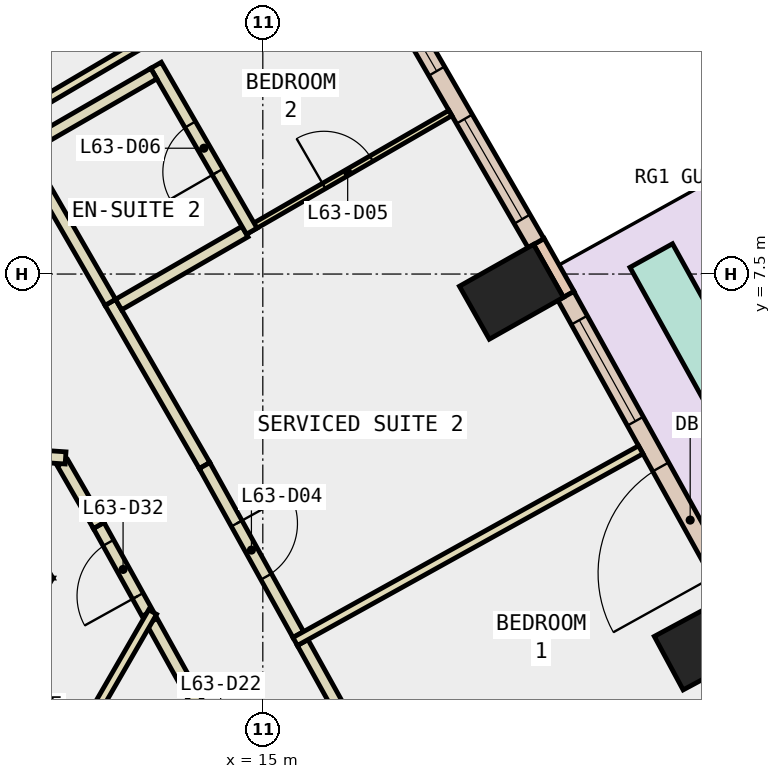
"""IFC4 building model, lengths in metres.
Left out: names, types, materials, properties, quantities, classifications, styles, units other than length and angle.
Written with IfcOpenShell. Run it as: python <this file> out.ifc"""

import sys

from ifc_helpers import new_model, si_unit, direction, frame, frame_2d, origin, origin_2d, place, context, subcontext, project, spatial, polyline, rectangle, outline, extrude, element, fill, save


model = new_model("IFC4")
c1 = context("Model", 3, precision=1e-05, world=origin(), true_north=direction((0.0, 1.0)))
c2 = subcontext(c1, "Body", "Model", "MODEL_VIEW")
j1 = project(units=[si_unit("LENGTHUNIT", "METRE"), si_unit("PLANEANGLEUNIT", "RADIAN")], contexts=[c1])
p1 = place(None, origin())
s1 = spatial("IfcSite", under=j1, at=p1, CompositionType="ELEMENT")
p2 = place(p1, origin())
s2 = spatial("IfcBuilding", under=s1, at=p2, CompositionType="ELEMENT")
p3 = place(p2, frame((0.0, 0.0, 273.8)))
s3 = spatial("IfcBuildingStorey", under=s2, at=p3, CompositionType="ELEMENT", Elevation=273.8)
for number, where, z_axis, x_axis in (
    (1, (22.292, 1.433, -0.34), (0.0, 0.0, 1.0), (-0.474, 0.881, 0.0)),
    (2, (19.089, 7.208, -0.34), (0.0, 0.0, 1.0), (-0.491, 0.871, 0.0)),
):
    element("IfcColumn", number, at=place(p3, frame(where, z_axis=z_axis, x_axis=x_axis)), inside=s3, PredefinedType="COLUMN", context=c2, shape_type="SweptSolid", body=[
        extrude(rectangle(XDim=1.0, YDim=1.4, at=origin_2d()), origin(), (0.0, 0.0, 1.0), 3.6),
    ])
p4 = place(p3, frame((0.0, 0.0, -0.34)))
e3 = element("IfcWall", 3, at=p4, inside=s3, PredefinedType="SHEAR", context=c2, shape_type="SweptSolid", body=[
    extrude(outline(polyline([(6.786, 10.747), (5.833, 10.197), (10.277, 2.5), (11.547, 2.5), (6.786, 10.747)])), origin(), (0.0, 0.0, 1.0), 3.6),
])
p5 = place(p3, frame((0.0, 0.0, -0.34)))
e4 = element("IfcWall", 4, at=p5, inside=s3, PredefinedType="SHEAR", context=c2, shape_type="SweptSolid", body=[
    extrude(outline(polyline([(5.774, -7.5), (11.547, 2.5), (10.277, 2.5), (5.138, -6.4), (5.774, -7.5)])), origin(), (0.0, 0.0, 1.0), 3.6),
])
p6 = place(p3, frame((20.032, 7.165, 0.0), z_axis=(0.0, 0.0, 1.0), x_axis=(-0.491848119507, 0.870681013539, 0.0)))
e5 = element("IfcWall", 5, at=p6, inside=s3, PredefinedType="STANDARD", context=c2, shape_type="SweptSolid", body=[
    extrude(rectangle(XDim=1.0, YDim=0.2, at=frame_2d((0.5, 0.0))), origin(), (0.0, 0.0, 1.0), 3.26),
])
p7 = place(p3, frame((22.71, 2.225, 0.0), z_axis=(0.0, 0.0, 1.0), x_axis=(-0.485049005017, 0.874486971162, 0.0)))
e6 = element("IfcWall", 6, at=p7, inside=s3, PredefinedType="STANDARD", context=c2, shape_type="SweptSolid", body=[
    extrude(rectangle(XDim=5.62, YDim=0.3, at=frame_2d((2.81, 0.0))), origin(), (0.0, 0.0, 1.0), 3.26),
])
p8 = place(p7, frame((0.405, 0.0, 0.0)))
e7 = element("IfcOpeningElement", 7, at=p8, cuts=e6, PredefinedType="OPENING", context=c2, shape_type="SweptSolid", body=[
    extrude(rectangle(XDim=2.0, YDim=2.4, at=frame_2d((1.0, 1.2))), frame((0.0, 0.16, 0.0), z_axis=(0.0, -1.0, 0.0), x_axis=(1.0, 0.0, 0.0)), (0.0, 0.0, 1.0), 0.32),
])
p9 = place(p7, frame((3.265, 0.0, 0.9)))
e8 = element("IfcOpeningElement", 8, at=p9, cuts=e6, PredefinedType="OPENING", context=c2, shape_type="SweptSolid", body=[
    extrude(rectangle(XDim=1.9, YDim=2.0, at=frame_2d((0.95, 1.0))), frame((0.0, 0.16, 0.0), z_axis=(0.0, -1.0, 0.0), x_axis=(1.0, 0.0, 0.0)), (0.0, 0.0, 1.0), 0.32),
])
p10 = place(p3, frame((19.493, 8.008, 0.0), z_axis=(0.0, 0.0, 1.0), x_axis=(-0.49999685976, 0.866027216796, 0.0)))
e9 = element("IfcWall", 9, at=p10, inside=s3, PredefinedType="STANDARD", context=c2, shape_type="SweptSolid", body=[
    extrude(rectangle(XDim=5.622, YDim=0.3, at=frame_2d((2.811, 0.0))), origin(), (0.0, 0.0, 1.0), 3.26),
])
p11 = place(p10, frame((0.456, 0.0, 0.9)))
e10 = element("IfcOpeningElement", 10, at=p11, cuts=e9, PredefinedType="OPENING", context=c2, shape_type="SweptSolid", body=[
    extrude(rectangle(XDim=1.9, YDim=2.0, at=frame_2d((0.95, 1.0))), frame((0.0, 0.16, 0.0), z_axis=(0.0, -1.0, 0.0), x_axis=(1.0, 0.0, 0.0)), (0.0, 0.0, 1.0), 0.32),
])
p12 = place(p10, frame((3.267, 0.0, 0.9)))
e11 = element("IfcOpeningElement", 11, at=p12, cuts=e9, PredefinedType="OPENING", context=c2, shape_type="SweptSolid", body=[
    extrude(rectangle(XDim=1.9, YDim=2.0, at=frame_2d((0.95, 1.0))), frame((0.0, 0.16, 0.0), z_axis=(0.0, -1.0, 0.0), x_axis=(1.0, 0.0, 0.0)), (0.0, 0.0, 1.0), 0.32),
])
p13 = place(p3, frame((24.017, 3.064, 0.0), z_axis=(0.0, 0.0, 1.0), x_axis=(-0.485053879715, 0.87448426731, 0.0)))
e12 = element("IfcWall", 12, at=p13, inside=s3, PredefinedType="STANDARD", context=c2, shape_type="SweptSolid", body=[
    extrude(rectangle(XDim=5.42, YDim=0.8, at=frame_2d((2.71, 0.0))), origin(), (0.0, 0.0, 1.0), 0.8),
])
p14 = place(p3, frame((13.102, 1.921, 0.0), z_axis=(0.0, 0.0, 1.0), x_axis=(-0.485065409582, 0.874477871891, 0.0)))
e13 = element("IfcWall", 13, at=p14, inside=s3, PredefinedType="PARTITIONING", context=c2, shape_type="SweptSolid", body=[
    extrude(rectangle(XDim=1.651, YDim=0.2, at=frame_2d((0.826, 0.0))), origin(), (0.0, 0.0, 1.0), 3.26),
])
p15 = place(p14, frame((0.325, 0.0, 0.0)))
e14 = element("IfcOpeningElement", 14, at=p15, cuts=e13, PredefinedType="OPENING", context=c2, shape_type="SweptSolid", body=[
    extrude(rectangle(XDim=1.0, YDim=2.1, at=frame_2d((0.5, 1.05))), frame((0.0, 0.11, 0.0), z_axis=(0.0, -1.0, 0.0), x_axis=(1.0, 0.0, 0.0)), (0.0, 0.0, 1.0), 0.22),
])
p16 = place(p3, frame((12.301, 3.365, 0.0), z_axis=(0.0, 0.0, 1.0), x_axis=(-0.499823064078, 0.86612753369, 0.0)))
e15 = element("IfcWall", 15, at=p16, inside=s3, PredefinedType="PARTITIONING", context=c2, shape_type="SweptSolid", body=[
    extrude(rectangle(XDim=1.19, YDim=0.2, at=frame_2d((0.595, 0.0))), origin(), (0.0, 0.0, 1.0), 3.26),
])
p17 = place(p3, frame((11.756, 4.476, 0.0), z_axis=(0.0, 0.0, 1.0), x_axis=(-0.99772020739, 0.067486204256, 0.0)))
e16 = element("IfcWall", 16, at=p17, inside=s3, PredefinedType="PARTITIONING", context=c2, shape_type="SweptSolid", body=[
    extrude(rectangle(XDim=1.407, YDim=0.2, at=frame_2d((0.704, 0.0))), origin(), (0.0, 0.0, 1.0), 3.26),
])
p18 = place(p3, frame((15.439, -2.293, 0.0), z_axis=(0.0, 0.0, 1.0), x_axis=(-0.485079003918, 0.874470331091, 0.0)))
e17 = element("IfcWall", 17, at=p18, inside=s3, PredefinedType="PARTITIONING", context=c2, shape_type="SweptSolid", body=[
    extrude(rectangle(XDim=4.669, YDim=0.2, at=frame_2d((2.334, 0.0))), origin(), (0.0, 0.0, 1.0), 3.26),
])
p19 = place(p18, frame((1.834, 0.0, 0.0)))
e18 = element("IfcOpeningElement", 18, at=p19, cuts=e17, PredefinedType="OPENING", context=c2, shape_type="SweptSolid", body=[
    extrude(rectangle(XDim=1.0, YDim=2.1, at=frame_2d((0.5, 1.05))), frame((0.0, 0.11, 0.0), z_axis=(0.0, -1.0, 0.0), x_axis=(1.0, 0.0, 0.0)), (0.0, 0.0, 1.0), 0.22),
])
p20 = place(p3, frame((15.655, 1.44, 0.0), z_axis=(0.0, 0.0, 1.0), x_axis=(0.485107756493, -0.87445438108, 0.0)))
e19 = element("IfcWall", 19, at=p20, inside=s3, PredefinedType="PARTITIONING", context=c2, shape_type="SweptSolid", body=[
    extrude(rectangle(XDim=3.177, YDim=0.2, at=frame_2d((1.588, 0.0))), origin(), (0.0, 0.0, 1.0), 3.26),
])
p21 = place(p3, frame((12.492, 7.035, 0.0), z_axis=(0.0, 0.0, 1.0), x_axis=(0.49999285859, -0.86602952684, 0.0)))
e20 = element("IfcWall", 20, at=p21, inside=s3, PredefinedType="PARTITIONING", context=c2, shape_type="SweptSolid", body=[
    extrude(rectangle(XDim=3.1, YDim=0.2, at=frame_2d((1.55, 0.0))), origin(), (0.0, 0.0, 1.0), 3.26),
])
p22 = place(p3, frame((14.042, 4.35, 0.0), z_axis=(0.0, 0.0, 1.0), x_axis=(0.484944791944, -0.874544766588, 0.0)))
e21 = element("IfcWall", 21, at=p22, inside=s3, PredefinedType="PARTITIONING", context=c2, shape_type="SweptSolid", body=[
    extrude(rectangle(XDim=3.178, YDim=0.2, at=frame_2d((1.589, 0.0))), origin(), (0.0, 0.0, 1.0), 3.26),
])
p23 = place(p22, frame((1.089, 0.0, 0.0)))
e22 = element("IfcOpeningElement", 22, at=p23, cuts=e21, PredefinedType="OPENING", context=c2, shape_type="SweptSolid", body=[
    extrude(rectangle(XDim=1.0, YDim=2.1, at=frame_2d((0.5, 1.05))), frame((0.0, 0.11, 0.0), z_axis=(0.0, -1.0, 0.0), x_axis=(1.0, 0.0, 0.0)), (0.0, 0.0, 1.0), 0.22),
])
p24 = place(p3, frame((10.992, 9.633, 0.0), z_axis=(0.0, 0.0, 1.0), x_axis=(0.499990139034, -0.866031096941, 0.0)))
e23 = element("IfcWall", 23, at=p24, inside=s3, PredefinedType="PARTITIONING", context=c2, shape_type="SweptSolid", body=[
    extrude(rectangle(XDim=3.0, YDim=0.2, at=frame_2d((1.5, 0.0))), origin(), (0.0, 0.0, 1.0), 3.26),
])
p25 = place(p3, frame((15.532, 1.457, 0.0), z_axis=(0.0, 0.0, 1.0), x_axis=(0.874467143452, 0.485084750351, 0.0)))
e24 = element("IfcWall", 24, at=p25, inside=s3, PredefinedType="PARTITIONING", context=c2, shape_type="SweptSolid", body=[
    extrude(rectangle(XDim=6.5, YDim=0.15, at=frame_2d((3.25, 0.0))), origin(), (0.0, 0.0, 1.0), 3.26),
])
p26 = place(p3, frame((14.707, 8.198, 0.0), z_axis=(0.0, 0.0, 1.0), x_axis=(0.865995823051, 0.500051231833, 0.0)))
e25 = element("IfcWall", 25, at=p26, inside=s3, PredefinedType="PARTITIONING", context=c2, shape_type="SweptSolid", body=[
    extrude(rectangle(XDim=3.899, YDim=0.1, at=frame_2d((1.95, 0.0))), origin(), (0.0, 0.0, 1.0), 3.26),
])
p27 = place(p26, frame((1.5, 0.0, 0.0)))
e26 = element("IfcOpeningElement", 26, at=p27, cuts=e25, PredefinedType="OPENING", context=c2, shape_type="SweptSolid", body=[
    extrude(rectangle(XDim=0.9, YDim=2.1, at=frame_2d((0.45, 1.05))), frame((0.0, 0.06, 0.0), z_axis=(0.0, -1.0, 0.0), x_axis=(1.0, 0.0, 0.0)), (0.0, 0.0, 1.0), 0.12),
])
p28 = place(p3, frame((12.628, 6.998, 0.0), z_axis=(0.0, 0.0, 1.0), x_axis=(0.866100915363, 0.499869187296, 0.0)))
e27 = element("IfcWall", 27, at=p28, inside=s3, PredefinedType="PARTITIONING", context=c2, shape_type="SweptSolid", body=[
    extrude(rectangle(XDim=2.401, YDim=0.2, at=frame_2d((1.2, 0.0))), origin(), (0.0, 0.0, 1.0), 3.26),
])
p29 = place(p3, frame((14.818, 8.205, 0.0), z_axis=(0.0, 0.0, 1.0), x_axis=(-0.499807449307, 0.866136544441, 0.0)))
e28 = element("IfcWall", 28, at=p29, inside=s3, PredefinedType="PARTITIONING", context=c2, shape_type="SweptSolid", body=[
    extrude(rectangle(XDim=3.15, YDim=0.2, at=frame_2d((1.575, 0.0))), origin(), (0.0, 0.0, 1.0), 3.26),
])
p30 = place(p29, frame((1.125, 0.0, 0.0)))
e29 = element("IfcOpeningElement", 29, at=p30, cuts=e28, PredefinedType="OPENING", context=c2, shape_type="SweptSolid", body=[
    extrude(rectangle(XDim=0.9, YDim=2.1, at=frame_2d((0.45, 1.05))), frame((0.0, 0.11, 0.0), z_axis=(0.0, -1.0, 0.0), x_axis=(1.0, 0.0, 0.0)), (0.0, 0.0, 1.0), 0.22),
])
p31 = place(p3, frame((13.207, 10.796, 0.0), z_axis=(0.0, 0.0, 1.0), x_axis=(-0.866022959057, -0.500004234368, 0.0)))
e30 = element("IfcWall", 30, at=p31, inside=s3, PredefinedType="PARTITIONING", context=c2, shape_type="SweptSolid", body=[
    extrude(rectangle(XDim=2.5, YDim=0.2, at=frame_2d((1.25, 0.0))), origin(), (0.0, 0.0, 1.0), 3.26),
])
p32 = place(p3, frame((10.702, 9.934, 0.0), z_axis=(0.0, 0.0, 1.0), x_axis=(0.861684553056, 0.507444313225, 0.0)))
e31 = element("IfcWall", 31, at=p32, inside=s3, PredefinedType="PARTITIONING", context=c2, shape_type="SweptSolid", body=[
    extrude(rectangle(XDim=5.181, YDim=0.15, at=frame_2d((2.59, 0.0))), origin(), (0.0, 0.0, 1.0), 3.26),
])
p33 = place(p3, frame((9.25, -4.879, 0.0), z_axis=(0.0, 0.0, 1.0), x_axis=(0.499999725187, 0.866025562448, 0.0)))
e32 = element("IfcWall", 32, at=p33, inside=s3, PredefinedType="PARTITIONING", context=c2, shape_type="SweptSolid", body=[
    extrude(rectangle(XDim=7.876, YDim=0.15, at=frame_2d((3.938, 0.0))), origin(), (0.0, 0.0, 1.0), 3.26),
])
p34 = place(p8, origin())
e33 = element("IfcDoor", 33, at=p34, inside=s3, OperationType="SLIDING_TO_LEFT", PredefinedType="DOOR", context=c2, shape_type="SweptSolid", body=[
    extrude(rectangle(XDim=2.0, YDim=2.4, at=frame_2d((1.0, 1.2))), frame((0.0, 0.025, 0.0), z_axis=(0.0, -1.0, 0.0), x_axis=(1.0, 0.0, 0.0)), (0.0, 0.0, 1.0), 0.05),
])
fill(e7, e33)
p35 = place(p9, origin())
e34 = element("IfcWindow", 34, at=p35, inside=s3, PartitioningType="SINGLE_PANEL", PredefinedType="WINDOW", context=c2, shape_type="SweptSolid", body=[
    extrude(rectangle(XDim=1.9, YDim=2.0, at=frame_2d((0.95, 1.0))), frame((0.0, 0.03, 0.0), z_axis=(0.0, -1.0, 0.0), x_axis=(1.0, 0.0, 0.0)), (0.0, 0.0, 1.0), 0.06),
])
fill(e8, e34)
p36 = place(p11, origin())
e35 = element("IfcWindow", 35, at=p36, inside=s3, PartitioningType="SINGLE_PANEL", PredefinedType="WINDOW", context=c2, shape_type="SweptSolid", body=[
    extrude(rectangle(XDim=1.9, YDim=2.0, at=frame_2d((0.95, 1.0))), frame((0.0, 0.03, 0.0), z_axis=(0.0, -1.0, 0.0), x_axis=(1.0, 0.0, 0.0)), (0.0, 0.0, 1.0), 0.06),
])
fill(e10, e35)
p37 = place(p12, origin())
e36 = element("IfcWindow", 36, at=p37, inside=s3, PartitioningType="SINGLE_PANEL", PredefinedType="WINDOW", context=c2, shape_type="SweptSolid", body=[
    extrude(rectangle(XDim=1.9, YDim=2.0, at=frame_2d((0.95, 1.0))), frame((0.0, 0.03, 0.0), z_axis=(0.0, -1.0, 0.0), x_axis=(1.0, 0.0, 0.0)), (0.0, 0.0, 1.0), 0.06),
])
fill(e11, e36)
p38 = place(p23, origin())
e37 = element("IfcDoor", 37, at=p38, inside=s3, OperationType="SINGLE_SWING_LEFT", PredefinedType="DOOR", context=c2, shape_type="SweptSolid", body=[
    extrude(rectangle(XDim=1.0, YDim=2.1, at=frame_2d((0.5, 1.05))), frame((0.0, 0.025, 0.0), z_axis=(0.0, -1.0, 0.0), x_axis=(1.0, 0.0, 0.0)), (0.0, 0.0, 1.0), 0.05),
])
fill(e22, e37)
p39 = place(p27, origin())
e38 = element("IfcDoor", 38, at=p39, inside=s3, OperationType="SINGLE_SWING_LEFT", PredefinedType="DOOR", context=c2, shape_type="SweptSolid", body=[
    extrude(rectangle(XDim=0.9, YDim=2.1, at=frame_2d((0.45, 1.05))), frame((0.0, 0.025, 0.0), z_axis=(0.0, -1.0, 0.0), x_axis=(1.0, 0.0, 0.0)), (0.0, 0.0, 1.0), 0.05),
])
fill(e26, e38)
p40 = place(p30, origin())
e39 = element("IfcDoor", 39, at=p40, inside=s3, OperationType="SINGLE_SWING_RIGHT", PredefinedType="DOOR", context=c2, shape_type="SweptSolid", body=[
    extrude(rectangle(XDim=0.9, YDim=2.1, at=frame_2d((0.45, 1.05))), frame((0.0, 0.025, 0.0), z_axis=(0.0, -1.0, 0.0), x_axis=(1.0, 0.0, 0.0)), (0.0, 0.0, 1.0), 0.05),
])
fill(e29, e39)
p41 = place(p15, origin())
e40 = element("IfcDoor", 40, at=p41, inside=s3, OperationType="SINGLE_SWING_RIGHT", PredefinedType="DOOR", context=c2, shape_type="SweptSolid", body=[
    extrude(rectangle(XDim=1.0, YDim=2.1, at=frame_2d((0.5, 1.05))), frame((0.0, 0.025, 0.0), z_axis=(0.0, -1.0, 0.0), x_axis=(1.0, 0.0, 0.0)), (0.0, 0.0, 1.0), 0.05),
])
fill(e14, e40)
save(model, sys.argv[1])
